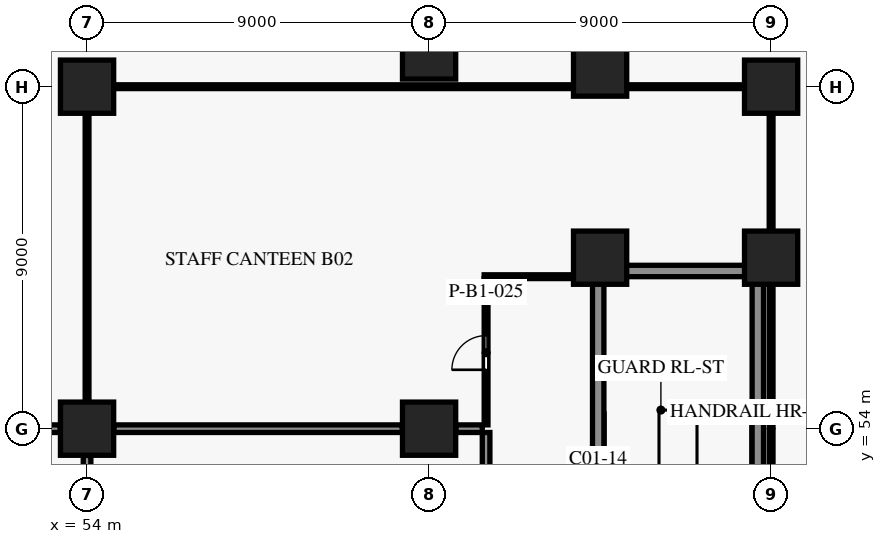
"""IFC4 building model, lengths in metres.
Left out: names, types, materials, properties, quantities, classifications, styles, units other than length and angle.
Written with IfcOpenShell. Run it as: python <this file> out.ifc"""

import sys

from ifc_helpers import new_model, si_unit, direction, frame, frame_2d, origin, origin_2d, place, context, subcontext, project, spatial, rectangle, extrude, element, fill, save


model = new_model("IFC4")
c1 = context("Model", 3, precision=1e-05, world=origin(), true_north=direction((0.0, 1.0)))
c2 = subcontext(c1, "Body", "Model", "MODEL_VIEW")
j1 = project(units=[si_unit("LENGTHUNIT", "METRE"), si_unit("PLANEANGLEUNIT", "RADIAN")], contexts=[c1])
p1 = place(None, origin())
s1 = spatial("IfcSite", under=j1, at=p1, CompositionType="ELEMENT")
p2 = place(p1, origin())
s2 = spatial("IfcBuilding", under=s1, at=p2, CompositionType="ELEMENT")
p3 = place(p2, frame((0.0, 0.0, -6.0)))
s3 = spatial("IfcBuildingStorey", under=s2, at=p3, CompositionType="ELEMENT", Elevation=-6.0)
for number, where, z_axis, x_axis in (
    (1, (72.0, 58.5, 0.0), (0.0, 0.0, 1.0), (1.0, 0.0, 0.0)),
    (2, (67.5, 63.45, 0.0), (0.0, 0.0, 1.0), (1.0, 0.0, 0.0)),
    (3, (63.0, 63.9, 0.0), (0.0, 0.0, 1.0), (1.0, 0.0, 0.0)),
    (4, (54.0, 63.0, 0.0), (0.0, 0.0, 1.0), (1.0, 0.0, 0.0)),
    (5, (67.5, 58.5, 0.0), (0.0, 0.0, 1.0), (1.0, 0.0, 0.0)),
    (6, (54.0, 54.0, 0.0), (0.0, 0.0, 1.0), (1.0, 0.0, 0.0)),
    (7, (63.0, 54.0, 0.0), (0.0, 0.0, 1.0), (1.0, 0.0, 0.0)),
    (8, (72.0, 63.0, 0.0), (0.0, 0.0, 1.0), (1.0, 0.0, 0.0)),
):
    element("IfcColumn", number, at=place(p3, frame(where, z_axis=z_axis, x_axis=x_axis)), inside=s3, PredefinedType="COLUMN", context=c2, shape_type="SweptSolid", body=[
        extrude(rectangle(XDim=1.4, YDim=1.4, at=origin_2d()), origin(), (0.0, 0.0, 1.0), 6.0),
    ])
p4 = place(p3, frame((67.6, 58.15, 0.0), z_axis=(0.0, 0.0, 1.0), x_axis=(1.0, 0.0, 0.0)))
e9 = element("IfcWall", 9, at=p4, inside=s3, PredefinedType="SHEAR", context=c2, shape_type="SweptSolid", body=[
    extrude(rectangle(XDim=3.9, YDim=0.3, at=frame_2d((1.95, 0.0))), origin(), (0.0, 0.0, 1.0), 5.6),
])
p5 = place(p3, frame((67.45, 49.7, 0.0), z_axis=(0.0, 0.0, 1.0), x_axis=(0.0, 1.0, 0.0)))
e10 = element("IfcWall", 10, at=p5, inside=s3, PredefinedType="SHEAR", context=c2, shape_type="SweptSolid", body=[
    extrude(rectangle(XDim=8.6, YDim=0.3, at=frame_2d((4.3, 0.0))), origin(), (0.0, 0.0, 1.0), 5.6),
])
p6 = place(p5, frame((0.7, 0.0, 0.0)))
e11 = element("IfcOpeningElement", 11, at=p6, cuts=e10, PredefinedType="OPENING", context=c2, shape_type="SweptSolid", body=[
    extrude(rectangle(XDim=1.2, YDim=2.2, at=frame_2d((0.6, 1.1))), frame((0.0, 0.16, 0.0), z_axis=(0.0, -1.0, 0.0), x_axis=(1.0, 0.0, 0.0)), (0.0, 0.0, 1.0), 0.32),
])
p7 = place(p3, frame((71.65, 49.7, 0.0), z_axis=(0.0, 0.0, 1.0), x_axis=(0.0, 1.0, 0.0)))
e12 = element("IfcWall", 12, at=p7, inside=s3, PredefinedType="SHEAR", context=c2, shape_type="SweptSolid", body=[
    extrude(rectangle(XDim=8.6, YDim=0.3, at=frame_2d((4.3, 0.0))), origin(), (0.0, 0.0, 1.0), 5.6),
])
p8 = place(p3, frame((64.5, 45.1, 0.0), z_axis=(0.0, 0.0, 1.0), x_axis=(0.0, 1.0, 0.0)))
e13 = element("IfcWall", 13, at=p8, inside=s3, PredefinedType="PARTITIONING", context=c2, shape_type="SweptSolid", body=[
    extrude(rectangle(XDim=8.8, YDim=0.2, at=frame_2d((4.4, 0.0))), origin(), (0.0, 0.0, 1.0), 5.58),
])
p9 = place(p8, frame((3.95, 0.0, 0.0)))
e14 = element("IfcOpeningElement", 14, at=p9, cuts=e13, PredefinedType="OPENING", context=c2, shape_type="SweptSolid", body=[
    extrude(rectangle(XDim=0.9, YDim=2.1, at=frame_2d((0.45, 1.05))), frame((0.0, 0.11, 0.0), z_axis=(0.0, -1.0, 0.0), x_axis=(1.0, 0.0, 0.0)), (0.0, 0.0, 1.0), 0.22),
])
p10 = place(p3, frame((54.0, 45.705, 0.0), z_axis=(0.0, 0.0, 1.0), x_axis=(0.0, 1.0, 0.0)))
e15 = element("IfcWall", 15, at=p10, inside=s3, PredefinedType="PARTITIONING", context=c2, shape_type="SweptSolid", body=[
    extrude(rectangle(XDim=7.59, YDim=0.2, at=frame_2d((3.795, 0.0))), origin(), (0.0, 0.0, 1.0), 5.58),
])
p11 = place(p3, frame((72.0, 53.95, 0.0), z_axis=(0.0, 0.0, 1.0), x_axis=(0.0, -1.0, 0.0)))
e16 = element("IfcWall", 16, at=p11, inside=s3, PredefinedType="PARTITIONING", context=c2, shape_type="SweptSolid", body=[
    extrude(rectangle(XDim=3.745, YDim=0.1, at=frame_2d((1.873, 0.0))), origin(), (0.0, 0.0, 1.0), 5.58),
])
for number, where, z_axis, x_axis in (
    (17, (45.705, 54.0, 0.0), (0.0, 0.0, 1.0), (1.0, 0.0, 0.0)),
    (18, (62.295, 54.0, 0.0), (0.0, 0.0, 1.0), (-1.0, 0.0, 0.0)),
):
    element("IfcWall", number, at=place(p3, frame(where, z_axis=z_axis, x_axis=x_axis)), inside=s3, PredefinedType="PARTITIONING", context=c2, shape_type="SweptSolid", body=[
        extrude(rectangle(XDim=7.59, YDim=0.2, at=frame_2d((3.795, 0.0))), origin(), (0.0, 0.0, 1.0), 5.58),
    ])
p12 = place(p3, frame((64.4, 54.0, 0.0), z_axis=(0.0, 0.0, 1.0), x_axis=(-1.0, 0.0, 0.0)))
e19 = element("IfcWall", 19, at=p12, inside=s3, PredefinedType="PARTITIONING", context=c2, shape_type="SweptSolid", body=[
    extrude(rectangle(XDim=0.695, YDim=0.2, at=frame_2d((0.347, 0.0))), origin(), (0.0, 0.0, 1.0), 5.58),
])
p13 = place(p3, frame((64.5, 54.1, 0.0), z_axis=(0.0, 0.0, 1.0), x_axis=(0.0, 1.0, 0.0)))
e20 = element("IfcWall", 20, at=p13, inside=s3, PredefinedType="PARTITIONING", context=c2, shape_type="SweptSolid", body=[
    extrude(rectangle(XDim=3.85, YDim=0.1, at=frame_2d((1.925, 0.0))), origin(), (0.0, 0.0, 1.0), 5.58),
])
p14 = place(p13, frame((1.45, 0.0, 0.0)))
e21 = element("IfcOpeningElement", 21, at=p14, cuts=e20, PredefinedType="OPENING", context=c2, shape_type="SweptSolid", body=[
    extrude(rectangle(XDim=0.9, YDim=2.1, at=frame_2d((0.45, 1.05))), frame((0.0, 0.06, 0.0), z_axis=(0.0, -1.0, 0.0), x_axis=(1.0, 0.0, 0.0)), (0.0, 0.0, 1.0), 0.12),
])
p15 = place(p3, frame((54.0, 54.705, 0.0), z_axis=(0.0, 0.0, 1.0), x_axis=(0.0, 1.0, 0.0)))
e22 = element("IfcWall", 22, at=p15, inside=s3, PredefinedType="PARTITIONING", context=c2, shape_type="SweptSolid", body=[
    extrude(rectangle(XDim=7.59, YDim=0.1, at=frame_2d((3.795, 0.0))), origin(), (0.0, 0.0, 1.0), 5.58),
])
p16 = place(p3, frame((72.0, 57.795, 0.0), z_axis=(0.0, 0.0, 1.0), x_axis=(0.0, -1.0, 0.0)))
e23 = element("IfcWall", 23, at=p16, inside=s3, PredefinedType="PARTITIONING", context=c2, shape_type="SweptSolid", body=[
    extrude(rectangle(XDim=3.745, YDim=0.1, at=frame_2d((1.873, 0.0))), origin(), (0.0, 0.0, 1.0), 5.58),
])
p17 = place(p3, frame((64.45, 58.0, 0.0), z_axis=(0.0, 0.0, 1.0), x_axis=(1.0, 0.0, 0.0)))
e24 = element("IfcWall", 24, at=p17, inside=s3, PredefinedType="PARTITIONING", context=c2, shape_type="SweptSolid", body=[
    extrude(rectangle(XDim=2.345, YDim=0.1, at=frame_2d((1.172, 0.0))), origin(), (0.0, 0.0, 1.0), 5.58),
])
p18 = place(p3, frame((72.0, 62.295, 0.0), z_axis=(0.0, 0.0, 1.0), x_axis=(0.0, -1.0, 0.0)))
e25 = element("IfcWall", 25, at=p18, inside=s3, PredefinedType="PARTITIONING", context=c2, shape_type="SweptSolid", body=[
    extrude(rectangle(XDim=3.09, YDim=0.1, at=frame_2d((1.545, 0.0))), origin(), (0.0, 0.0, 1.0), 5.58),
])
p19 = place(p3, frame((54.705, 63.0, 0.0), z_axis=(0.0, 0.0, 1.0), x_axis=(1.0, 0.0, 0.0)))
e26 = element("IfcWall", 26, at=p19, inside=s3, PredefinedType="PARTITIONING", context=c2, shape_type="SweptSolid", body=[
    extrude(rectangle(XDim=12.09, YDim=0.1, at=frame_2d((6.045, 0.0))), origin(), (0.0, 0.0, 1.0), 5.58),
])
p20 = place(p3, frame((68.205, 63.0, 0.0), z_axis=(0.0, 0.0, 1.0), x_axis=(1.0, 0.0, 0.0)))
e27 = element("IfcWall", 27, at=p20, inside=s3, PredefinedType="PARTITIONING", context=c2, shape_type="SweptSolid", body=[
    extrude(rectangle(XDim=3.09, YDim=0.1, at=frame_2d((1.545, 0.0))), origin(), (0.0, 0.0, 1.0), 5.58),
])
p21 = place(p14, origin())
e28 = element("IfcDoor", 28, at=p21, inside=s3, OperationType="SINGLE_SWING_LEFT", PredefinedType="DOOR", context=c2, shape_type="SweptSolid", body=[
    extrude(rectangle(XDim=0.9, YDim=2.1, at=frame_2d((0.45, 1.05))), frame((0.0, 0.025, 0.0), z_axis=(0.0, -1.0, 0.0), x_axis=(1.0, 0.0, 0.0)), (0.0, 0.0, 1.0), 0.05),
])
fill(e21, e28)
save(model, sys.argv[1])
